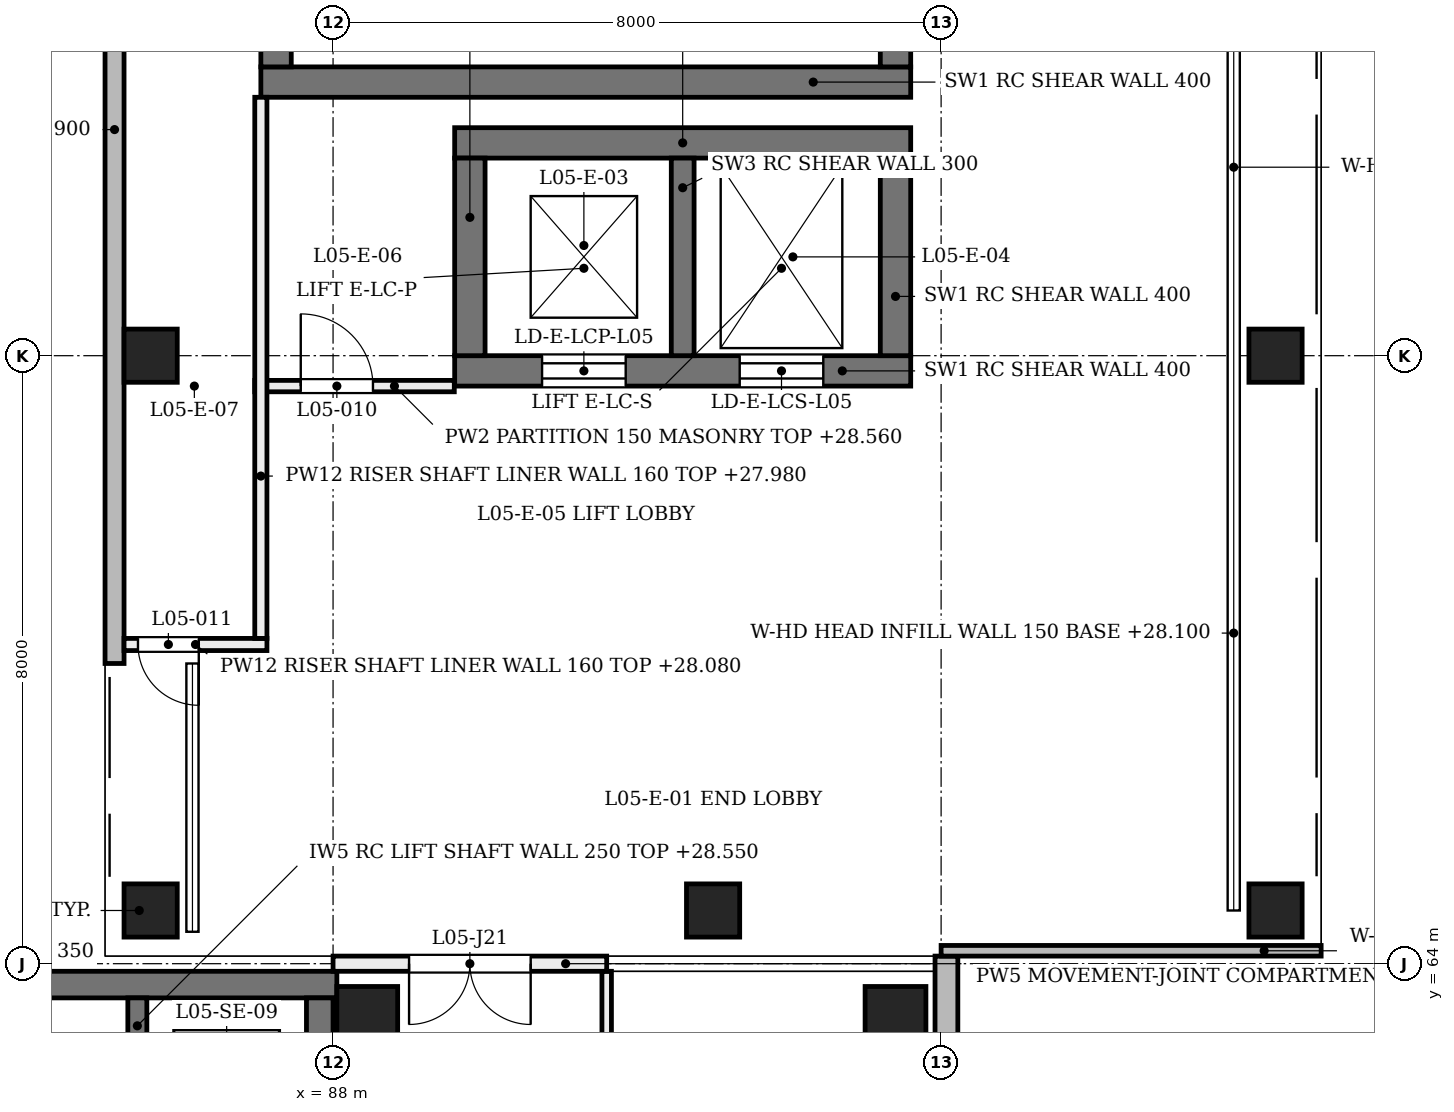
"""IFC4 building model, lengths in metres.
Left out: names, types, materials, properties, quantities, classifications, styles, units other than length and angle.
Written with IfcOpenShell. Run it as: python <this file> out.ifc"""

import sys

from ifc_helpers import new_model, si_unit, direction, frame, frame_2d, origin, origin_2d, place, context, subcontext, project, spatial, rectangle, extrude, element, fill, save


model = new_model("IFC4")
c1 = context("Model", 3, precision=1e-05, world=origin(), true_north=direction((0.0, 1.0)))
c2 = subcontext(c1, "Body", "Model", "MODEL_VIEW")
j1 = project(units=[si_unit("LENGTHUNIT", "METRE"), si_unit("PLANEANGLEUNIT", "RADIAN")], contexts=[c1])
p1 = place(None, origin())
s1 = spatial("IfcSite", under=j1, at=p1, CompositionType="ELEMENT")
p2 = place(p1, origin())
s2 = spatial("IfcBuilding", under=s1, at=p2, CompositionType="ELEMENT")
p3 = place(p2, frame((0.0, 0.0, 24.0)))
s3 = spatial("IfcBuildingStorey", under=s2, at=p3, CompositionType="ELEMENT", Elevation=24.0)
p4 = place(p3, frame((89.6, 71.8, 0.0), z_axis=(0.0, 0.0, 1.0), x_axis=(1.0, 0.0, 0.0)))
e1 = element("IfcWall", 1, at=p4, inside=s3, PredefinedType="SHEAR", context=c2, shape_type="SweptSolid", body=[
    extrude(rectangle(XDim=6.0, YDim=0.4, at=frame_2d((3.0, 0.0))), origin(), (0.0, 0.0, 1.0), 4.58),
])
p5 = place(p4, frame((1.15, 0.0, 0.0)))
e2 = element("IfcOpeningElement", 2, at=p5, cuts=e1, PredefinedType="OPENING", context=c2, shape_type="SweptSolid", body=[
    extrude(rectangle(XDim=1.1, YDim=2.1, at=frame_2d((0.55, 1.05))), frame((0.0, 0.21, 0.0), z_axis=(0.0, -1.0, 0.0), x_axis=(1.0, 0.0, 0.0)), (0.0, 0.0, 1.0), 0.42),
])
p6 = place(p4, frame((3.75, 0.0, 0.0)))
e3 = element("IfcOpeningElement", 3, at=p6, cuts=e1, PredefinedType="OPENING", context=c2, shape_type="SweptSolid", body=[
    extrude(rectangle(XDim=1.1, YDim=2.1, at=frame_2d((0.55, 1.05))), frame((0.0, 0.21, 0.0), z_axis=(0.0, -1.0, 0.0), x_axis=(1.0, 0.0, 0.0)), (0.0, 0.0, 1.0), 0.42),
])
p7 = place(p3, frame((89.6, 74.8, 0.0), z_axis=(0.0, 0.0, 1.0), x_axis=(1.0, 0.0, 0.0)))
e4 = element("IfcWall", 4, at=p7, inside=s3, PredefinedType="SHEAR", context=c2, shape_type="SweptSolid", body=[
    extrude(rectangle(XDim=6.0, YDim=0.4, at=frame_2d((3.0, 0.0))), origin(), (0.0, 0.0, 1.0), 4.58),
])
for number, where, z_axis, x_axis in (
    (5, (89.8, 72.0, 0.0), (0.0, 0.0, 1.0), (0.0, 1.0, 0.0)),
    (6, (95.4, 72.0, 0.0), (0.0, 0.0, 1.0), (0.0, 1.0, 0.0)),
):
    element("IfcWall", number, at=place(p3, frame(where, z_axis=z_axis, x_axis=x_axis)), inside=s3, PredefinedType="SHEAR", context=c2, shape_type="SweptSolid", body=[
        extrude(rectangle(XDim=2.6, YDim=0.4, at=frame_2d((1.3, 0.0))), origin(), (0.0, 0.0, 1.0), 4.58),
    ])
p8 = place(p3, frame((92.6, 72.0, 0.0), z_axis=(0.0, 0.0, 1.0), x_axis=(0.0, 1.0, 0.0)))
e7 = element("IfcWall", 7, at=p8, inside=s3, PredefinedType="SHEAR", context=c2, shape_type="SweptSolid", body=[
    extrude(rectangle(XDim=2.6, YDim=0.3, at=frame_2d((1.3, 0.0))), origin(), (0.0, 0.0, 1.0), 4.58),
])
p9 = place(p3, frame((87.05, 75.6, 0.0), z_axis=(0.0, 0.0, 1.0), x_axis=(1.0, 0.0, 0.0)))
e8 = element("IfcWall", 8, at=p9, inside=s3, PredefinedType="SHEAR", context=c2, shape_type="SweptSolid", body=[
    extrude(rectangle(XDim=8.55, YDim=0.4, at=frame_2d((4.275, 0.0))), origin(), (0.0, 0.0, 1.0), 4.58),
])
p10 = place(p3, frame((87.25, 75.8, 0.0), z_axis=(0.0, 0.0, 1.0), x_axis=(0.0, 1.0, 0.0)))
e9 = element("IfcWall", 9, at=p10, inside=s3, PredefinedType="SHEAR", context=c2, shape_type="SweptSolid", body=[
    extrude(rectangle(XDim=15.6, YDim=0.4, at=frame_2d((7.8, 0.0))), origin(), (0.0, 0.0, 1.0), 4.58),
])
p11 = place(p3, frame((95.4, 75.8, 0.0), z_axis=(0.0, 0.0, 1.0), x_axis=(0.0, 1.0, 0.0)))
e10 = element("IfcWall", 10, at=p11, inside=s3, PredefinedType="SHEAR", context=c2, shape_type="SweptSolid", body=[
    extrude(rectangle(XDim=15.6, YDim=0.4, at=frame_2d((7.8, 0.0))), origin(), (0.0, 0.0, 1.0), 4.58),
])
p12 = place(p11, frame((3.223, 0.0, 0.0)))
e11 = element("IfcOpeningElement", 11, at=p12, cuts=e10, PredefinedType="OPENING", context=c2, shape_type="SweptSolid", body=[
    extrude(rectangle(XDim=1.3, YDim=2.2, at=frame_2d((0.65, 1.1))), frame((0.0, 0.21, 0.0), z_axis=(0.0, -1.0, 0.0), x_axis=(1.0, 0.0, 0.0)), (0.0, 0.0, 1.0), 0.42),
])
p13 = place(p3, frame((80.1, 63.725, 0.0), z_axis=(0.0, 0.0, 1.0), x_axis=(1.0, 0.0, 0.0)))
e12 = element("IfcWall", 12, at=p13, inside=s3, PredefinedType="SHEAR", context=c2, shape_type="SweptSolid", body=[
    extrude(rectangle(XDim=7.95, YDim=0.35, at=frame_2d((3.975, 0.0))), origin(), (0.0, 0.0, 1.0), 4.58),
])
p14 = place(p3, frame((87.825, 48.35, 0.0), z_axis=(0.0, 0.0, 1.0), x_axis=(0.0, 1.0, 0.0)))
e13 = element("IfcWall", 13, at=p14, inside=s3, PredefinedType="SHEAR", context=c2, shape_type="SweptSolid", body=[
    extrude(rectangle(XDim=15.2, YDim=0.35, at=frame_2d((7.6, 0.0))), origin(), (0.0, 0.0, 1.0), 4.58),
])
p15 = place(p14, frame((0.95, 0.0, 0.0)))
e14 = element("IfcOpeningElement", 14, at=p15, cuts=e13, PredefinedType="OPENING", context=c2, shape_type="SweptSolid", body=[
    extrude(rectangle(XDim=1.0, YDim=2.1, at=frame_2d((0.5, 1.05))), frame((0.0, 0.185, 0.0), z_axis=(0.0, -1.0, 0.0), x_axis=(1.0, 0.0, 0.0)), (0.0, 0.0, 1.0), 0.37),
])
p16 = place(p14, frame((10.6, 0.0, 0.0)))
e15 = element("IfcOpeningElement", 15, at=p16, cuts=e13, PredefinedType="OPENING", context=c2, shape_type="SweptSolid", body=[
    extrude(rectangle(XDim=1.4, YDim=2.1, at=frame_2d((0.7, 1.05))), frame((0.0, 0.185, 0.0), z_axis=(0.0, -1.0, 0.0), x_axis=(1.0, 0.0, 0.0)), (0.0, 0.0, 1.0), 0.37),
])
for number, where, z_axis, x_axis in (
    (16, (88.45, 63.3, 0.0), (0.0, 0.0, 1.0), (1.0, 0.0, 0.0)),
    (17, (95.4, 63.3, 0.0), (0.0, 0.0, 1.0), (1.0, 0.0, 0.0)),
):
    element("IfcColumn", number, at=place(p3, frame(where, z_axis=z_axis, x_axis=x_axis)), inside=s3, PredefinedType="COLUMN", context=c2, shape_type="SweptSolid", body=[
        extrude(rectangle(XDim=0.8, YDim=0.8, at=origin_2d()), origin(), (0.0, 0.0, 1.0), 4.8),
    ])
for number, where, z_axis, x_axis in (
    (18, (85.6, 64.7, 0.0), (0.0, 0.0, 1.0), (1.0, 0.0, 0.0)),
    (19, (85.6, 72.0, 0.0), (0.0, 0.0, 1.0), (1.0, 0.0, 0.0)),
    (20, (93.0, 64.7, 0.0), (0.0, 0.0, 1.0), (1.0, 0.0, 0.0)),
    (21, (100.4, 64.7, 0.0), (0.0, 0.0, 1.0), (1.0, 0.0, 0.0)),
    (22, (100.4, 72.0, 0.0), (0.0, 0.0, 1.0), (1.0, 0.0, 0.0)),
):
    element("IfcColumn", number, at=place(p3, frame(where, z_axis=z_axis, x_axis=x_axis)), inside=s3, PredefinedType="COLUMN", context=c2, shape_type="SweptSolid", body=[
        extrude(rectangle(XDim=0.7, YDim=0.7, at=origin_2d()), origin(), (0.0, 0.0, 1.0), 4.58),
    ])
p17 = place(p3, frame((99.85, 64.9, 4.1), z_axis=(0.0, 0.0, 1.0), x_axis=(0.0, 1.0, 0.0)))
e23 = element("IfcWall", 23, at=p17, inside=s3, PredefinedType="SOLIDWALL", context=c2, shape_type="SweptSolid", body=[
    extrude(rectangle(XDim=6.9, YDim=0.15, at=frame_2d((3.45, 0.0))), origin(), (0.0, 0.0, 1.0), 0.48),
])
p18 = place(p3, frame((99.85, 72.2, 4.1), z_axis=(0.0, 0.0, 1.0), x_axis=(0.0, 1.0, 0.0)))
e24 = element("IfcWall", 24, at=p18, inside=s3, PredefinedType="SOLIDWALL", context=c2, shape_type="SweptSolid", body=[
    extrude(rectangle(XDim=7.6, YDim=0.15, at=frame_2d((3.8, 0.0))), origin(), (0.0, 0.0, 1.0), 0.48),
])
p19 = place(p3, frame((85.125, 67.95, 0.0), z_axis=(0.0, 0.0, 1.0), x_axis=(0.0, 1.0, 0.0)))
e25 = element("IfcWall", 25, at=p19, inside=s3, PredefinedType="SOLIDWALL", context=c2, shape_type="SweptSolid", body=[
    extrude(rectangle(XDim=24.1, YDim=0.25, at=frame_2d((12.05, 0.0))), origin(), (0.0, 0.0, 1.0), 3.9),
])
p20 = place(p3, frame((96.07, 47.7, 0.0), z_axis=(0.0, 0.0, 1.0), x_axis=(0.0, 1.0, 0.0)))
e26 = element("IfcWall", 26, at=p20, inside=s3, PredefinedType="SOLIDWALL", context=c2, shape_type="SweptSolid", body=[
    extrude(rectangle(XDim=16.4, YDim=0.3, at=frame_2d((8.2, 0.0))), origin(), (0.0, 0.0, 1.0), 3.9),
])
p21 = place(p20, frame((0.9, 0.0, 0.75)))
e27 = element("IfcOpeningElement", 27, at=p21, cuts=e26, PredefinedType="OPENING", context=c2, shape_type="SweptSolid", body=[
    extrude(rectangle(XDim=0.9, YDim=3.1, at=frame_2d((0.45, 1.55))), frame((0.0, 0.16, 0.0), z_axis=(0.0, -1.0, 0.0), x_axis=(1.0, 0.0, 0.0)), (0.0, 0.0, 1.0), 0.32),
])
p22 = place(p20, frame((3.6, 0.0, 0.75)))
e28 = element("IfcOpeningElement", 28, at=p22, cuts=e26, PredefinedType="OPENING", context=c2, shape_type="SweptSolid", body=[
    extrude(rectangle(XDim=0.9, YDim=3.1, at=frame_2d((0.45, 1.55))), frame((0.0, 0.16, 0.0), z_axis=(0.0, -1.0, 0.0), x_axis=(1.0, 0.0, 0.0)), (0.0, 0.0, 1.0), 0.32),
])
p23 = place(p20, frame((6.3, 0.0, 0.75)))
e29 = element("IfcOpeningElement", 29, at=p23, cuts=e26, PredefinedType="OPENING", context=c2, shape_type="SweptSolid", body=[
    extrude(rectangle(XDim=0.9, YDim=3.1, at=frame_2d((0.45, 1.55))), frame((0.0, 0.16, 0.0), z_axis=(0.0, -1.0, 0.0), x_axis=(1.0, 0.0, 0.0)), (0.0, 0.0, 1.0), 0.32),
])
p24 = place(p20, frame((9.0, 0.0, 0.75)))
e30 = element("IfcOpeningElement", 30, at=p24, cuts=e26, PredefinedType="OPENING", context=c2, shape_type="SweptSolid", body=[
    extrude(rectangle(XDim=0.9, YDim=3.1, at=frame_2d((0.45, 1.55))), frame((0.0, 0.16, 0.0), z_axis=(0.0, -1.0, 0.0), x_axis=(1.0, 0.0, 0.0)), (0.0, 0.0, 1.0), 0.32),
])
p25 = place(p20, frame((11.7, 0.0, 0.75)))
e31 = element("IfcOpeningElement", 31, at=p25, cuts=e26, PredefinedType="OPENING", context=c2, shape_type="SweptSolid", body=[
    extrude(rectangle(XDim=0.9, YDim=3.1, at=frame_2d((0.45, 1.55))), frame((0.0, 0.16, 0.0), z_axis=(0.0, -1.0, 0.0), x_axis=(1.0, 0.0, 0.0)), (0.0, 0.0, 1.0), 0.32),
])
p26 = place(p20, frame((14.4, 0.0, 0.75)))
e32 = element("IfcOpeningElement", 32, at=p26, cuts=e26, PredefinedType="OPENING", context=c2, shape_type="SweptSolid", body=[
    extrude(rectangle(XDim=0.9, YDim=3.1, at=frame_2d((0.45, 1.55))), frame((0.0, 0.16, 0.0), z_axis=(0.0, -1.0, 0.0), x_axis=(1.0, 0.0, 0.0)), (0.0, 0.0, 1.0), 0.32),
])
p27 = place(p3, frame((96.0, 64.17, 0.0), z_axis=(0.0, 0.0, 1.0), x_axis=(1.0, 0.0, 0.0)))
e33 = element("IfcWall", 33, at=p27, inside=s3, PredefinedType="SOLIDWALL", context=c2, shape_type="SweptSolid", body=[
    extrude(rectangle(XDim=5.0, YDim=0.14, at=frame_2d((2.5, 0.0))), origin(), (0.0, 0.0, 1.0), 3.9),
])
p28 = place(p3, frame((85.425, 61.1, 0.0), z_axis=(0.0, 0.0, 1.0), x_axis=(0.0, 1.0, 0.0)))
e34 = element("IfcWall", 34, at=p28, inside=s3, PredefinedType="SOLIDWALL", context=c2, shape_type="SweptSolid", body=[
    extrude(rectangle(XDim=2.45, YDim=0.25, at=frame_2d((1.225, 0.0))), origin(), (0.0, 0.0, 1.0), 4.55),
])
p29 = place(p3, frame((85.25, 68.2, 0.0), z_axis=(0.0, 0.0, 1.0), x_axis=(1.0, 0.0, 0.0)))
e35 = element("IfcWall", 35, at=p29, inside=s3, PredefinedType="PARTITIONING", context=c2, shape_type="SweptSolid", body=[
    extrude(rectangle(XDim=1.88, YDim=0.16, at=frame_2d((0.94, 0.0))), origin(), (0.0, 0.0, 1.0), 4.08),
])
p30 = place(p29, frame((0.183, 0.0, 0.0)))
e36 = element("IfcOpeningElement", 36, at=p30, cuts=e35, PredefinedType="OPENING", context=c2, shape_type="SweptSolid", body=[
    extrude(rectangle(XDim=0.8, YDim=2.1, at=frame_2d((0.4, 1.05))), frame((0.0, 0.09, 0.0), z_axis=(0.0, -1.0, 0.0), x_axis=(1.0, 0.0, 0.0)), (0.0, 0.0, 1.0), 0.18),
])
p31 = place(p3, frame((86.97, 71.6, 0.0), z_axis=(0.0, 0.0, 1.0), x_axis=(1.0, 0.0, 0.0)))
e37 = element("IfcWall", 37, at=p31, inside=s3, PredefinedType="PARTITIONING", context=c2, shape_type="SweptSolid", body=[
    extrude(rectangle(XDim=2.625, YDim=0.15, at=frame_2d((1.312, 0.0))), origin(), (0.0, 0.0, 1.0), 4.56),
])
p32 = place(p31, frame((0.605, 0.0, 0.0)))
e38 = element("IfcOpeningElement", 38, at=p32, cuts=e37, PredefinedType="OPENING", context=c2, shape_type="SweptSolid", body=[
    extrude(rectangle(XDim=0.95, YDim=2.1, at=frame_2d((0.475, 1.05))), frame((0.0, 0.085, 0.0), z_axis=(0.0, -1.0, 0.0), x_axis=(1.0, 0.0, 0.0)), (0.0, 0.0, 1.0), 0.17),
])
p33 = place(p3, frame((87.05, 68.28, 0.0), z_axis=(0.0, 0.0, 1.0), x_axis=(0.0, 1.0, 0.0)))
e39 = element("IfcWall", 39, at=p33, inside=s3, PredefinedType="PARTITIONING", context=c2, shape_type="SweptSolid", body=[
    extrude(rectangle(XDim=7.12, YDim=0.16, at=frame_2d((3.56, 0.0))), origin(), (0.0, 0.0, 1.0), 3.98),
])
p34 = place(p3, frame((91.6, 53.677, 0.0), z_axis=(0.0, 0.0, 1.0), x_axis=(0.0, 1.0, 0.0)))
e40 = element("IfcWall", 40, at=p34, inside=s3, PredefinedType="PARTITIONING", context=c2, shape_type="SweptSolid", body=[
    extrude(rectangle(XDim=10.223, YDim=0.125, at=frame_2d((5.112, 0.0))), origin(), (0.0, 0.0, 1.0), 3.88),
])
p35 = place(p34, frame((8.059, 0.0, 0.0)))
e41 = element("IfcOpeningElement", 41, at=p35, cuts=e40, PredefinedType="OPENING", context=c2, shape_type="SweptSolid", body=[
    extrude(rectangle(XDim=0.9, YDim=2.1, at=frame_2d((0.45, 1.05))), frame((0.0, 0.073, 0.0), z_axis=(0.0, -1.0, 0.0), x_axis=(1.0, 0.0, 0.0)), (0.0, 0.0, 1.0), 0.145),
])
p36 = place(p3, frame((88.0, 64.0, 0.0), z_axis=(0.0, 0.0, 1.0), x_axis=(1.0, 0.0, 0.0)))
e42 = element("IfcWall", 42, at=p36, inside=s3, PredefinedType="PARTITIONING", context=c2, shape_type="SweptSolid", body=[
    extrude(rectangle(XDim=3.6, YDim=0.2, at=frame_2d((1.8, 0.0))), origin(), (0.0, 0.0, 1.0), 3.88),
])
p37 = place(p36, frame((1.0, 0.0, 0.0)))
e43 = element("IfcOpeningElement", 43, at=p37, cuts=e42, PredefinedType="OPENING", context=c2, shape_type="SweptSolid", body=[
    extrude(rectangle(XDim=1.6, YDim=2.1, at=frame_2d((0.8, 1.05))), frame((0.0, 0.11, 0.0), z_axis=(0.0, -1.0, 0.0), x_axis=(1.0, 0.0, 0.0)), (0.0, 0.0, 1.0), 0.22),
])
p38 = place(p5, frame((1.1, 0.0, 0.0), z_axis=(0.0, 0.0, 1.0), x_axis=(-1.0, 0.0, 0.0)))
e44 = element("IfcDoor", 44, at=p38, inside=s3, OperationType="DOUBLE_DOOR_SLIDING", PredefinedType="DOOR", context=c2, shape_type="SweptSolid", body=[
    extrude(rectangle(XDim=1.1, YDim=2.1, at=frame_2d((0.55, 1.05))), frame((0.0, 0.025, 0.0), z_axis=(0.0, -1.0, 0.0), x_axis=(1.0, 0.0, 0.0)), (0.0, 0.0, 1.0), 0.05),
])
fill(e2, e44)
p39 = place(p6, frame((1.1, 0.0, 0.0), z_axis=(0.0, 0.0, 1.0), x_axis=(-1.0, 0.0, 0.0)))
e45 = element("IfcDoor", 45, at=p39, inside=s3, OperationType="DOUBLE_DOOR_SLIDING", PredefinedType="DOOR", context=c2, shape_type="SweptSolid", body=[
    extrude(rectangle(XDim=1.1, YDim=2.1, at=frame_2d((0.55, 1.05))), frame((0.0, 0.025, 0.0), z_axis=(0.0, -1.0, 0.0), x_axis=(1.0, 0.0, 0.0)), (0.0, 0.0, 1.0), 0.05),
])
fill(e3, e45)
p40 = place(p32, origin())
e46 = element("IfcDoor", 46, at=p40, inside=s3, OperationType="SINGLE_SWING_LEFT", PredefinedType="DOOR", context=c2, shape_type="SweptSolid", body=[
    extrude(rectangle(XDim=0.95, YDim=2.1, at=frame_2d((0.475, 1.05))), frame((0.0, 0.025, 0.0), z_axis=(0.0, -1.0, 0.0), x_axis=(1.0, 0.0, 0.0)), (0.0, 0.0, 1.0), 0.05),
])
fill(e38, e46)
p41 = place(p30, origin())
e47 = element("IfcDoor", 47, at=p41, inside=s3, OperationType="SINGLE_SWING_RIGHT", PredefinedType="DOOR", context=c2, shape_type="SweptSolid", body=[
    extrude(rectangle(XDim=0.8, YDim=2.1, at=frame_2d((0.4, 1.05))), frame((0.0, 0.025, 0.0), z_axis=(0.0, -1.0, 0.0), x_axis=(1.0, 0.0, 0.0)), (0.0, 0.0, 1.0), 0.05),
])
fill(e36, e47)
p42 = place(p37, frame((1.6, 0.0, 0.0), z_axis=(0.0, 0.0, 1.0), x_axis=(-1.0, 0.0, 0.0)))
e48 = element("IfcDoor", 48, at=p42, inside=s3, OperationType="DOUBLE_DOOR_SINGLE_SWING", PredefinedType="DOOR", context=c2, shape_type="SweptSolid", body=[
    extrude(rectangle(XDim=1.6, YDim=2.1, at=frame_2d((0.8, 1.05))), frame((0.0, 0.025, 0.0), z_axis=(0.0, -1.0, 0.0), x_axis=(1.0, 0.0, 0.0)), (0.0, 0.0, 1.0), 0.05),
])
fill(e43, e48)
save(model, sys.argv[1])
